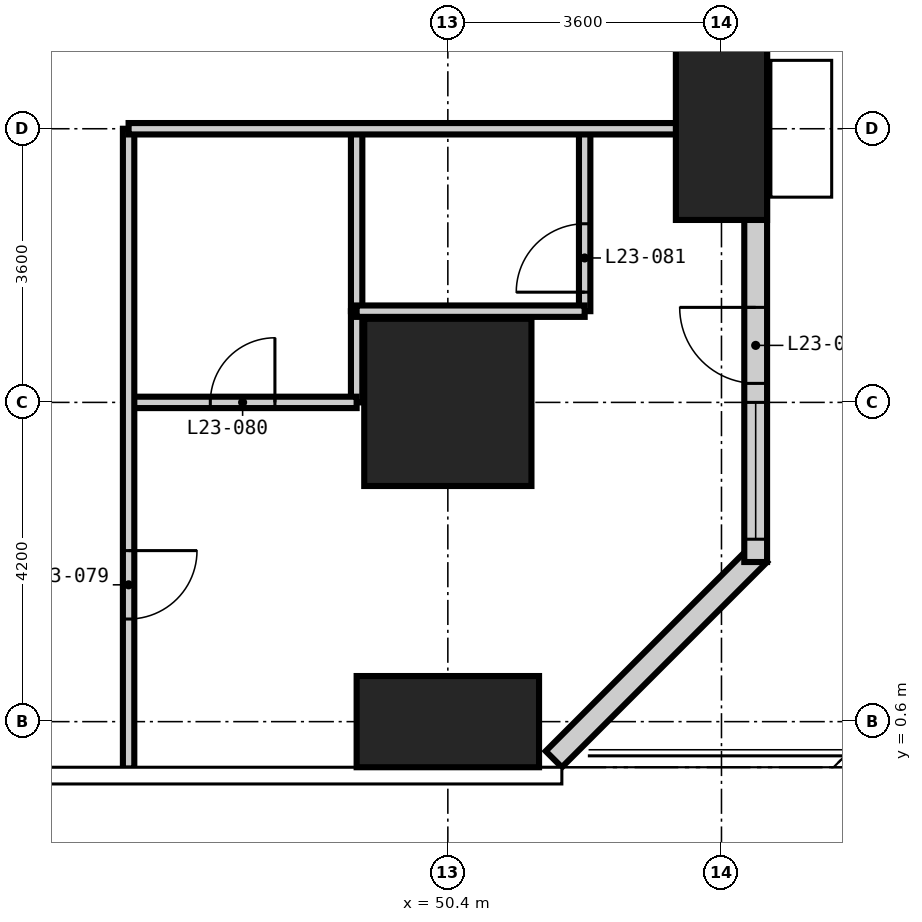
"""IFC4 building model, lengths in metres.
Left out: names, types, materials, properties, quantities, classifications, styles, units other than length and angle.
Written with IfcOpenShell. Run it as: python <this file> out.ifc"""

import sys

from ifc_helpers import new_model, si_unit, direction, frame, frame_2d, origin, origin_2d, place, context, subcontext, project, spatial, rectangle, extrude, element, fill, save


model = new_model("IFC4")
c1 = context("Model", 3, precision=1e-05, world=origin(), true_north=direction((0.0, 1.0)))
c2 = subcontext(c1, "Body", "Model", "MODEL_VIEW")
j1 = project(units=[si_unit("LENGTHUNIT", "METRE"), si_unit("PLANEANGLEUNIT", "RADIAN")], contexts=[c1])
p1 = place(None, origin())
s1 = spatial("IfcSite", under=j1, at=p1, CompositionType="ELEMENT")
p2 = place(p1, origin())
s2 = spatial("IfcBuilding", under=s1, at=p2, CompositionType="ELEMENT")
p3 = place(p2, frame((0.0, 0.0, 93.6)))
s3 = spatial("IfcBuildingStorey", under=s2, at=p3, CompositionType="ELEMENT", Elevation=93.6)
p4 = place(p3, frame((50.4, 0.6, -0.35), z_axis=(0.0, 0.0, 1.0), x_axis=(1.0, 0.0, 0.0)))
e1 = element("IfcColumn", 1, at=p4, inside=s3, PredefinedType="COLUMN", context=c2, shape_type="SweptSolid", body=[
    extrude(rectangle(XDim=2.4, YDim=1.2, at=origin_2d()), origin(), (0.0, 0.0, 1.0), 3.6),
])
p5 = place(p3, frame((50.4, 4.8, -0.35), z_axis=(0.0, 0.0, 1.0), x_axis=(1.0, 0.0, 0.0)))
e2 = element("IfcColumn", 2, at=p5, inside=s3, PredefinedType="COLUMN", context=c2, shape_type="SweptSolid", body=[
    extrude(rectangle(XDim=2.2, YDim=2.2, at=origin_2d()), origin(), (0.0, 0.0, 1.0), 3.6),
])
p6 = place(p3, frame((54.0, 8.4, -0.35), z_axis=(0.0, 0.0, 1.0), x_axis=(1.0, 0.0, 0.0)))
e3 = element("IfcColumn", 3, at=p6, inside=s3, PredefinedType="COLUMN", context=c2, shape_type="SweptSolid", body=[
    extrude(rectangle(XDim=1.2, YDim=2.4, at=origin_2d()), origin(), (0.0, 0.0, 1.0), 3.6),
])
p7 = place(p3, frame((51.794, 0.106, 0.0), z_axis=(0.0, 0.0, 1.0), x_axis=(0.707106781187, 0.707106781187, 0.0)))
e4 = element("IfcWall", 4, at=p7, inside=s3, PredefinedType="SOLIDWALL", context=c2, shape_type="SweptSolid", body=[
    extrude(rectangle(XDim=3.818, YDim=0.3, at=frame_2d((1.909, 0.0))), origin(), (0.0, 0.0, 1.0), 3.25),
])
p8 = place(p3, frame((54.45, 2.7, 0.0), z_axis=(0.0, 0.0, 1.0), x_axis=(0.0, 1.0, 0.0)))
e5 = element("IfcWall", 5, at=p8, inside=s3, PredefinedType="SOLIDWALL", context=c2, shape_type="SweptSolid", body=[
    extrude(rectangle(XDim=49.2, YDim=0.3, at=frame_2d((24.6, 0.0))), origin(), (0.0, 0.0, 1.0), 3.25),
])
p9 = place(p8, frame((2.35, 0.0, 0.0)))
e6 = element("IfcOpeningElement", 6, at=p9, cuts=e5, PredefinedType="OPENING", context=c2, shape_type="SweptSolid", body=[
    extrude(rectangle(XDim=1.0, YDim=2.4, at=frame_2d((0.5, 1.2))), frame((0.0, 0.16, 0.0), z_axis=(0.0, -1.0, 0.0), x_axis=(1.0, 0.0, 0.0)), (0.0, 0.0, 1.0), 0.32),
])
p10 = place(p8, frame((0.3, 0.0, 0.6)))
e7 = element("IfcOpeningElement", 7, at=p10, cuts=e5, PredefinedType="OPENING", context=c2, shape_type="SweptSolid", body=[
    extrude(rectangle(XDim=1.8, YDim=2.1, at=frame_2d((0.9, 1.05))), frame((0.0, 0.16, 0.0), z_axis=(0.0, -1.0, 0.0), x_axis=(1.0, 0.0, 0.0)), (0.0, 0.0, 1.0), 0.32),
])
p11 = place(p8, frame((9.4, 0.0, 0.0)))
e8 = element("IfcOpeningElement", 8, at=p11, cuts=e5, PredefinedType="OPENING", context=c2, shape_type="SweptSolid", body=[
    extrude(rectangle(XDim=1.0, YDim=2.4, at=frame_2d((0.5, 1.2))), frame((0.0, 0.16, 0.0), z_axis=(0.0, -1.0, 0.0), x_axis=(1.0, 0.0, 0.0)), (0.0, 0.0, 1.0), 0.32),
])
p12 = place(p8, frame((7.0, 0.0, 0.6)))
e9 = element("IfcOpeningElement", 9, at=p12, cuts=e5, PredefinedType="OPENING", context=c2, shape_type="SweptSolid", body=[
    extrude(rectangle(XDim=1.8, YDim=2.1, at=frame_2d((0.9, 1.05))), frame((0.0, 0.16, 0.0), z_axis=(0.0, -1.0, 0.0), x_axis=(1.0, 0.0, 0.0)), (0.0, 0.0, 1.0), 0.32),
])
p13 = place(p8, frame((10.7, 0.0, 0.6)))
e10 = element("IfcOpeningElement", 10, at=p13, cuts=e5, PredefinedType="OPENING", context=c2, shape_type="SweptSolid", body=[
    extrude(rectangle(XDim=1.8, YDim=2.1, at=frame_2d((0.9, 1.05))), frame((0.0, 0.16, 0.0), z_axis=(0.0, -1.0, 0.0), x_axis=(1.0, 0.0, 0.0)), (0.0, 0.0, 1.0), 0.32),
])
p14 = place(p8, frame((17.8, 0.0, 0.0)))
e11 = element("IfcOpeningElement", 11, at=p14, cuts=e5, PredefinedType="OPENING", context=c2, shape_type="SweptSolid", body=[
    extrude(rectangle(XDim=1.0, YDim=2.4, at=frame_2d((0.5, 1.2))), frame((0.0, 0.16, 0.0), z_axis=(0.0, -1.0, 0.0), x_axis=(1.0, 0.0, 0.0)), (0.0, 0.0, 1.0), 0.32),
])
p15 = place(p8, frame((15.7, 0.0, 0.6)))
e12 = element("IfcOpeningElement", 12, at=p15, cuts=e5, PredefinedType="OPENING", context=c2, shape_type="SweptSolid", body=[
    extrude(rectangle(XDim=1.8, YDim=2.1, at=frame_2d((0.9, 1.05))), frame((0.0, 0.16, 0.0), z_axis=(0.0, -1.0, 0.0), x_axis=(1.0, 0.0, 0.0)), (0.0, 0.0, 1.0), 0.32),
])
p16 = place(p8, frame((19.4, 0.0, 0.6)))
e13 = element("IfcOpeningElement", 13, at=p16, cuts=e5, PredefinedType="OPENING", context=c2, shape_type="SweptSolid", body=[
    extrude(rectangle(XDim=1.8, YDim=2.1, at=frame_2d((0.9, 1.05))), frame((0.0, 0.16, 0.0), z_axis=(0.0, -1.0, 0.0), x_axis=(1.0, 0.0, 0.0)), (0.0, 0.0, 1.0), 0.32),
])
p17 = place(p8, frame((26.2, 0.0, 0.0)))
e14 = element("IfcOpeningElement", 14, at=p17, cuts=e5, PredefinedType="OPENING", context=c2, shape_type="SweptSolid", body=[
    extrude(rectangle(XDim=1.0, YDim=2.4, at=frame_2d((0.5, 1.2))), frame((0.0, 0.16, 0.0), z_axis=(0.0, -1.0, 0.0), x_axis=(1.0, 0.0, 0.0)), (0.0, 0.0, 1.0), 0.32),
])
p18 = place(p8, frame((23.8, 0.0, 0.6)))
e15 = element("IfcOpeningElement", 15, at=p18, cuts=e5, PredefinedType="OPENING", context=c2, shape_type="SweptSolid", body=[
    extrude(rectangle(XDim=1.8, YDim=2.1, at=frame_2d((0.9, 1.05))), frame((0.0, 0.16, 0.0), z_axis=(0.0, -1.0, 0.0), x_axis=(1.0, 0.0, 0.0)), (0.0, 0.0, 1.0), 0.32),
])
p19 = place(p8, frame((27.8, 0.0, 0.6)))
e16 = element("IfcOpeningElement", 16, at=p19, cuts=e5, PredefinedType="OPENING", context=c2, shape_type="SweptSolid", body=[
    extrude(rectangle(XDim=1.8, YDim=2.1, at=frame_2d((0.9, 1.05))), frame((0.0, 0.16, 0.0), z_axis=(0.0, -1.0, 0.0), x_axis=(1.0, 0.0, 0.0)), (0.0, 0.0, 1.0), 0.32),
])
p20 = place(p8, frame((34.6, 0.0, 0.0)))
e17 = element("IfcOpeningElement", 17, at=p20, cuts=e5, PredefinedType="OPENING", context=c2, shape_type="SweptSolid", body=[
    extrude(rectangle(XDim=1.0, YDim=2.4, at=frame_2d((0.5, 1.2))), frame((0.0, 0.16, 0.0), z_axis=(0.0, -1.0, 0.0), x_axis=(1.0, 0.0, 0.0)), (0.0, 0.0, 1.0), 0.32),
])
p21 = place(p8, frame((32.2, 0.0, 0.6)))
e18 = element("IfcOpeningElement", 18, at=p21, cuts=e5, PredefinedType="OPENING", context=c2, shape_type="SweptSolid", body=[
    extrude(rectangle(XDim=1.8, YDim=2.1, at=frame_2d((0.9, 1.05))), frame((0.0, 0.16, 0.0), z_axis=(0.0, -1.0, 0.0), x_axis=(1.0, 0.0, 0.0)), (0.0, 0.0, 1.0), 0.32),
])
p22 = place(p8, frame((35.9, 0.0, 0.6)))
e19 = element("IfcOpeningElement", 19, at=p22, cuts=e5, PredefinedType="OPENING", context=c2, shape_type="SweptSolid", body=[
    extrude(rectangle(XDim=1.8, YDim=2.1, at=frame_2d((0.9, 1.05))), frame((0.0, 0.16, 0.0), z_axis=(0.0, -1.0, 0.0), x_axis=(1.0, 0.0, 0.0)), (0.0, 0.0, 1.0), 0.32),
])
p23 = place(p8, frame((40.9, 0.0, 0.0)))
e20 = element("IfcOpeningElement", 20, at=p23, cuts=e5, PredefinedType="OPENING", context=c2, shape_type="SweptSolid", body=[
    extrude(rectangle(XDim=1.0, YDim=2.4, at=frame_2d((0.5, 1.2))), frame((0.0, 0.16, 0.0), z_axis=(0.0, -1.0, 0.0), x_axis=(1.0, 0.0, 0.0)), (0.0, 0.0, 1.0), 0.32),
])
p24 = place(p8, frame((45.45, 0.0, 0.0)))
e21 = element("IfcOpeningElement", 21, at=p24, cuts=e5, PredefinedType="OPENING", context=c2, shape_type="SweptSolid", body=[
    extrude(rectangle(XDim=1.0, YDim=2.4, at=frame_2d((0.5, 1.2))), frame((0.0, 0.16, 0.0), z_axis=(0.0, -1.0, 0.0), x_axis=(1.0, 0.0, 0.0)), (0.0, 0.0, 1.0), 0.32),
])
p25 = place(p3, frame((49.2, 4.8, 0.0), z_axis=(0.0, 0.0, 1.0), x_axis=(0.0, 1.0, 0.0)))
e22 = element("IfcWall", 22, at=p25, inside=s3, PredefinedType="PARTITIONING", context=c2, shape_type="SweptSolid", body=[
    extrude(rectangle(XDim=1.2, YDim=0.15, at=frame_2d((0.6, 0.0))), origin(), (0.0, 0.0, 1.0), 3.25),
])
p26 = place(p3, frame((46.2, 4.8, 0.0), z_axis=(0.0, 0.0, 1.0), x_axis=(1.0, 0.0, 0.0)))
e23 = element("IfcWall", 23, at=p26, inside=s3, PredefinedType="PARTITIONING", context=c2, shape_type="SweptSolid", body=[
    extrude(rectangle(XDim=3.0, YDim=0.15, at=frame_2d((1.5, 0.0))), origin(), (0.0, 0.0, 1.0), 3.25),
])
p27 = place(p26, frame((1.075, 0.0, 0.0)))
e24 = element("IfcOpeningElement", 24, at=p27, cuts=e23, PredefinedType="OPENING", context=c2, shape_type="SweptSolid", body=[
    extrude(rectangle(XDim=0.85, YDim=2.1, at=frame_2d((0.425, 1.05))), frame((0.0, 0.085, 0.0), z_axis=(0.0, -1.0, 0.0), x_axis=(1.0, 0.0, 0.0)), (0.0, 0.0, 1.0), 0.17),
])
p28 = place(p3, frame((46.2, -0.018, 0.0), z_axis=(0.0, 0.0, 1.0), x_axis=(0.0, 1.0, 0.0)))
e25 = element("IfcWall", 25, at=p28, inside=s3, PredefinedType="PARTITIONING", context=c2, shape_type="SweptSolid", body=[
    extrude(rectangle(XDim=8.418, YDim=0.15, at=frame_2d((4.209, 0.0))), origin(), (0.0, 0.0, 1.0), 3.25),
])
p29 = place(p28, frame((1.968, 0.0, 0.0)))
e26 = element("IfcOpeningElement", 26, at=p29, cuts=e25, PredefinedType="OPENING", context=c2, shape_type="SweptSolid", body=[
    extrude(rectangle(XDim=0.9, YDim=2.1, at=frame_2d((0.45, 1.05))), frame((0.0, 0.085, 0.0), z_axis=(0.0, -1.0, 0.0), x_axis=(1.0, 0.0, 0.0)), (0.0, 0.0, 1.0), 0.17),
])
p30 = place(p3, frame((49.2, 6.0, 0.0), z_axis=(0.0, 0.0, 1.0), x_axis=(0.0, 1.0, 0.0)))
e27 = element("IfcWall", 27, at=p30, inside=s3, PredefinedType="PARTITIONING", context=c2, shape_type="SweptSolid", body=[
    extrude(rectangle(XDim=2.4, YDim=0.15, at=frame_2d((1.2, 0.0))), origin(), (0.0, 0.0, 1.0), 3.25),
])
p31 = place(p3, frame((52.2, 6.0, 0.0), z_axis=(0.0, 0.0, 1.0), x_axis=(0.0, 1.0, 0.0)))
e28 = element("IfcWall", 28, at=p31, inside=s3, PredefinedType="PARTITIONING", context=c2, shape_type="SweptSolid", body=[
    extrude(rectangle(XDim=2.4, YDim=0.15, at=frame_2d((1.2, 0.0))), origin(), (0.0, 0.0, 1.0), 3.25),
])
p32 = place(p31, frame((0.25, 0.0, 0.0)))
e29 = element("IfcOpeningElement", 29, at=p32, cuts=e28, PredefinedType="OPENING", context=c2, shape_type="SweptSolid", body=[
    extrude(rectangle(XDim=0.9, YDim=2.1, at=frame_2d((0.45, 1.05))), frame((0.0, 0.085, 0.0), z_axis=(0.0, -1.0, 0.0), x_axis=(1.0, 0.0, 0.0)), (0.0, 0.0, 1.0), 0.17),
])
p33 = place(p3, frame((49.2, 6.0, 0.0), z_axis=(0.0, 0.0, 1.0), x_axis=(1.0, 0.0, 0.0)))
e30 = element("IfcWall", 30, at=p33, inside=s3, PredefinedType="PARTITIONING", context=c2, shape_type="SweptSolid", body=[
    extrude(rectangle(XDim=3.0, YDim=0.15, at=frame_2d((1.5, 0.0))), origin(), (0.0, 0.0, 1.0), 3.25),
])
p34 = place(p3, frame((46.2, 8.4, 0.0), z_axis=(0.0, 0.0, 1.0), x_axis=(1.0, 0.0, 0.0)))
e31 = element("IfcWall", 31, at=p34, inside=s3, PredefinedType="PARTITIONING", context=c2, shape_type="SweptSolid", body=[
    extrude(rectangle(XDim=8.4, YDim=0.15, at=frame_2d((4.2, 0.0))), origin(), (0.0, 0.0, 1.0), 3.25),
])
p35 = place(p9, origin())
e32 = element("IfcDoor", 32, at=p35, inside=s3, OperationType="SINGLE_SWING_RIGHT", PredefinedType="DOOR", context=c2, shape_type="SweptSolid", body=[
    extrude(rectangle(XDim=1.0, YDim=2.4, at=frame_2d((0.5, 1.2))), frame((0.0, 0.025, 0.0), z_axis=(0.0, -1.0, 0.0), x_axis=(1.0, 0.0, 0.0)), (0.0, 0.0, 1.0), 0.05),
])
fill(e6, e32)
p36 = place(p10, origin())
e33 = element("IfcWindow", 33, at=p36, inside=s3, PartitioningType="SINGLE_PANEL", PredefinedType="WINDOW", context=c2, shape_type="SweptSolid", body=[
    extrude(rectangle(XDim=1.8, YDim=2.1, at=frame_2d((0.9, 1.05))), frame((0.0, 0.03, 0.0), z_axis=(0.0, -1.0, 0.0), x_axis=(1.0, 0.0, 0.0)), (0.0, 0.0, 1.0), 0.06),
])
fill(e7, e33)
p37 = place(p29, frame((0.9, 0.0, 0.0), z_axis=(0.0, 0.0, 1.0), x_axis=(-1.0, 0.0, 0.0)))
e34 = element("IfcDoor", 34, at=p37, inside=s3, OperationType="SINGLE_SWING_LEFT", PredefinedType="DOOR", context=c2, shape_type="SweptSolid", body=[
    extrude(rectangle(XDim=0.9, YDim=2.1, at=frame_2d((0.45, 1.05))), frame((0.0, 0.025, 0.0), z_axis=(0.0, -1.0, 0.0), x_axis=(1.0, 0.0, 0.0)), (0.0, 0.0, 1.0), 0.05),
])
fill(e26, e34)
p38 = place(p27, origin())
e35 = element("IfcDoor", 35, at=p38, inside=s3, OperationType="SINGLE_SWING_RIGHT", PredefinedType="DOOR", context=c2, shape_type="SweptSolid", body=[
    extrude(rectangle(XDim=0.85, YDim=2.1, at=frame_2d((0.425, 1.05))), frame((0.0, 0.025, 0.0), z_axis=(0.0, -1.0, 0.0), x_axis=(1.0, 0.0, 0.0)), (0.0, 0.0, 1.0), 0.05),
])
fill(e24, e35)
p39 = place(p32, origin())
e36 = element("IfcDoor", 36, at=p39, inside=s3, OperationType="SINGLE_SWING_LEFT", PredefinedType="DOOR", context=c2, shape_type="SweptSolid", body=[
    extrude(rectangle(XDim=0.9, YDim=2.1, at=frame_2d((0.45, 1.05))), frame((0.0, 0.025, 0.0), z_axis=(0.0, -1.0, 0.0), x_axis=(1.0, 0.0, 0.0)), (0.0, 0.0, 1.0), 0.05),
])
fill(e29, e36)
save(model, sys.argv[1])
